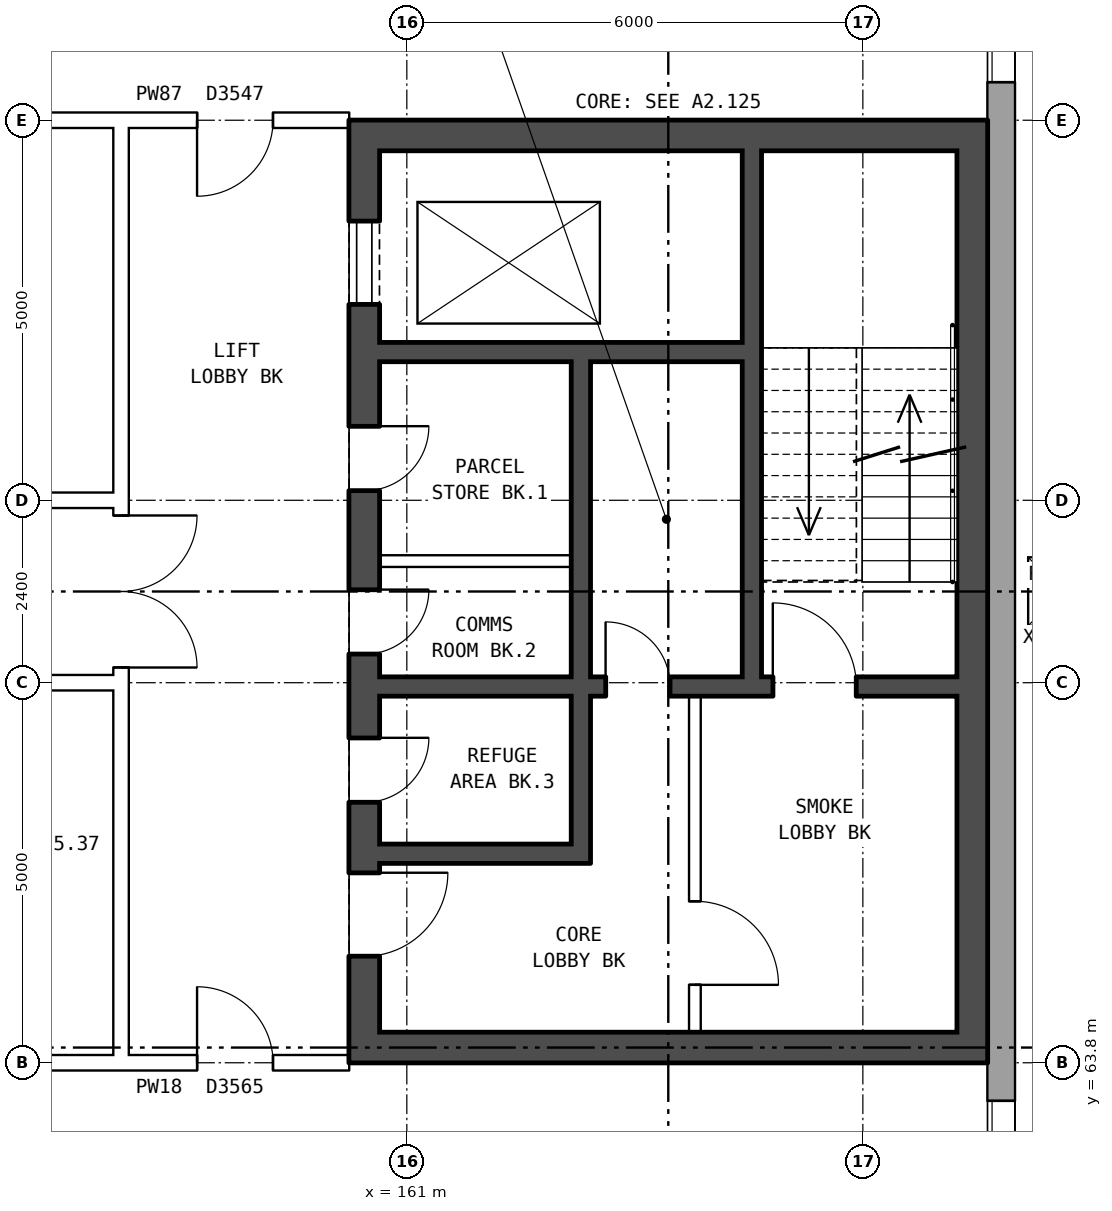
"""IFC4 building model, lengths in metres.
Left out: names, types, materials, properties, quantities, classifications, styles, units other than length and angle.
Written with IfcOpenShell. Run it as: python <this file> out.ifc"""

import sys

from ifc_helpers import new_model, si_unit, direction, frame, frame_2d, origin, origin_2d, place, context, subcontext, project, spatial, rectangle, extrude, element, fill, save


model = new_model("IFC4")
c1 = context("Model", 3, precision=1e-05, world=origin(), true_north=direction((0.0, 1.0)))
c2 = subcontext(c1, "Body", "Model", "MODEL_VIEW")
j1 = project(units=[si_unit("LENGTHUNIT", "METRE"), si_unit("PLANEANGLEUNIT", "RADIAN")], contexts=[c1])
p1 = place(None, origin())
s1 = spatial("IfcSite", under=j1, at=p1, CompositionType="ELEMENT")
p2 = place(p1, origin())
s2 = spatial("IfcBuilding", under=s1, at=p2, CompositionType="ELEMENT")
p3 = place(p2, frame((0.0, 0.0, 194.4)))
s3 = spatial("IfcBuildingStorey", under=s2, at=p3, CompositionType="ELEMENT", Elevation=194.4)
p4 = place(p3, frame((168.82, 57.075, 0.0), z_axis=(0.0, 0.0, 1.0), x_axis=(0.0, 1.0, 0.0)))
e1 = element("IfcWall", 1, at=p4, inside=s3, PredefinedType="STANDARD", context=c2, shape_type="SweptSolid", body=[
    extrude(rectangle(XDim=25.851, YDim=0.36, at=frame_2d((12.925, 0.0))), origin(), (0.0, 0.0, 1.0), 3.95),
])
p5 = place(p4, frame((1.625, 0.0, 1.5)))
e2 = element("IfcOpeningElement", 2, at=p5, cuts=e1, PredefinedType="OPENING", context=c2, shape_type="SweptSolid", body=[
    extrude(rectangle(XDim=1.6, YDim=1.2, at=frame_2d((0.8, 0.6))), frame((0.0, 0.19, 0.0), z_axis=(0.0, -1.0, 0.0), x_axis=(1.0, 0.0, 0.0)), (0.0, 0.0, 1.0), 0.38),
])
p6 = place(p4, frame((4.625, 0.0, 1.5)))
e3 = element("IfcOpeningElement", 3, at=p6, cuts=e1, PredefinedType="OPENING", context=c2, shape_type="SweptSolid", body=[
    extrude(rectangle(XDim=1.6, YDim=1.2, at=frame_2d((0.8, 0.6))), frame((0.0, 0.19, 0.0), z_axis=(0.0, -1.0, 0.0), x_axis=(1.0, 0.0, 0.0)), (0.0, 0.0, 1.0), 0.38),
])
p7 = place(p4, frame((19.625, 0.0, 1.5)))
e4 = element("IfcOpeningElement", 4, at=p7, cuts=e1, PredefinedType="OPENING", context=c2, shape_type="SweptSolid", body=[
    extrude(rectangle(XDim=1.6, YDim=1.2, at=frame_2d((0.8, 0.6))), frame((0.0, 0.19, 0.0), z_axis=(0.0, -1.0, 0.0), x_axis=(1.0, 0.0, 0.0)), (0.0, 0.0, 1.0), 0.38),
])
p8 = place(p4, frame((22.625, 0.0, 1.5)))
e5 = element("IfcOpeningElement", 5, at=p8, cuts=e1, PredefinedType="OPENING", context=c2, shape_type="SweptSolid", body=[
    extrude(rectangle(XDim=1.6, YDim=1.2, at=frame_2d((0.8, 0.6))), frame((0.0, 0.19, 0.0), z_axis=(0.0, -1.0, 0.0), x_axis=(1.0, 0.0, 0.0)), (0.0, 0.0, 1.0), 0.38),
])
p9 = place(p3, frame((160.44, 76.2, 0.0), z_axis=(0.0, 0.0, 1.0), x_axis=(0.0, -1.0, 0.0)))
e6 = element("IfcWall", 6, at=p9, inside=s3, PredefinedType="SHEAR", context=c2, shape_type="SweptSolid", body=[
    extrude(rectangle(XDim=12.4, YDim=0.4, at=frame_2d((6.2, 0.0))), origin(), (0.0, 0.0, 1.0), 3.95),
])
p10 = place(p9, frame((1.325, 0.0, 0.0)))
e7 = element("IfcOpeningElement", 7, at=p10, cuts=e6, PredefinedType="OPENING", context=c2, shape_type="SweptSolid", body=[
    extrude(rectangle(XDim=1.1, YDim=2.1, at=frame_2d((0.55, 1.05))), frame((0.0, 0.21, 0.0), z_axis=(0.0, -1.0, 0.0), x_axis=(1.0, 0.0, 0.0)), (0.0, 0.0, 1.0), 0.42),
])
p11 = place(p9, frame((4.025, 0.0, 0.0)))
e8 = element("IfcOpeningElement", 8, at=p11, cuts=e6, PredefinedType="OPENING", context=c2, shape_type="SweptSolid", body=[
    extrude(rectangle(XDim=0.85, YDim=2.1, at=frame_2d((0.425, 1.05))), frame((0.0, 0.21, 0.0), z_axis=(0.0, -1.0, 0.0), x_axis=(1.0, 0.0, 0.0)), (0.0, 0.0, 1.0), 0.42),
])
p12 = place(p9, frame((6.175, 0.0, 0.0)))
e9 = element("IfcOpeningElement", 9, at=p12, cuts=e6, PredefinedType="OPENING", context=c2, shape_type="SweptSolid", body=[
    extrude(rectangle(XDim=0.85, YDim=2.1, at=frame_2d((0.425, 1.05))), frame((0.0, 0.21, 0.0), z_axis=(0.0, -1.0, 0.0), x_axis=(1.0, 0.0, 0.0)), (0.0, 0.0, 1.0), 0.42),
])
p13 = place(p9, frame((9.9, 0.0, 0.0)))
e10 = element("IfcOpeningElement", 10, at=p13, cuts=e6, PredefinedType="OPENING", context=c2, shape_type="SweptSolid", body=[
    extrude(rectangle(XDim=1.1, YDim=2.1, at=frame_2d((0.55, 1.05))), frame((0.0, 0.21, 0.0), z_axis=(0.0, -1.0, 0.0), x_axis=(1.0, 0.0, 0.0)), (0.0, 0.0, 1.0), 0.42),
])
p14 = place(p9, frame((8.125, 0.0, 0.0)))
e11 = element("IfcOpeningElement", 11, at=p14, cuts=e6, PredefinedType="OPENING", context=c2, shape_type="SweptSolid", body=[
    extrude(rectangle(XDim=0.85, YDim=2.1, at=frame_2d((0.425, 1.05))), frame((0.0, 0.21, 0.0), z_axis=(0.0, -1.0, 0.0), x_axis=(1.0, 0.0, 0.0)), (0.0, 0.0, 1.0), 0.42),
])
p15 = place(p3, frame((168.44, 76.2, 0.0), z_axis=(0.0, 0.0, 1.0), x_axis=(0.0, -1.0, 0.0)))
e12 = element("IfcWall", 12, at=p15, inside=s3, PredefinedType="SHEAR", context=c2, shape_type="SweptSolid", body=[
    extrude(rectangle(XDim=12.4, YDim=0.4, at=frame_2d((6.2, 0.0))), origin(), (0.0, 0.0, 1.0), 3.95),
])
for number, where, z_axis, x_axis in (
    (13, (160.64, 76.0, 0.0), (0.0, 0.0, 1.0), (1.0, 0.0, 0.0)),
    (14, (160.64, 64.0, 0.0), (0.0, 0.0, 1.0), (1.0, 0.0, 0.0)),
):
    element("IfcWall", number, at=place(p3, frame(where, z_axis=z_axis, x_axis=x_axis)), inside=s3, PredefinedType="SHEAR", context=c2, shape_type="SweptSolid", body=[
        extrude(rectangle(XDim=7.6, YDim=0.4, at=frame_2d((3.8, 0.0))), origin(), (0.0, 0.0, 1.0), 3.95),
    ])
p16 = place(p3, frame((160.64, 73.15, 0.0), z_axis=(0.0, 0.0, 1.0), x_axis=(1.0, 0.0, 0.0)))
e15 = element("IfcWall", 15, at=p16, inside=s3, PredefinedType="SHEAR", context=c2, shape_type="SweptSolid", body=[
    extrude(rectangle(XDim=4.775, YDim=0.25, at=frame_2d((2.388, 0.0))), origin(), (0.0, 0.0, 1.0), 3.95),
])
p17 = place(p3, frame((160.64, 70.4, 0.0), z_axis=(0.0, 0.0, 1.0), x_axis=(1.0, 0.0, 0.0)))
e16 = element("IfcWall", 16, at=p17, inside=s3, PredefinedType="PARTITIONING", context=c2, shape_type="SweptSolid", body=[
    extrude(rectangle(XDim=2.525, YDim=0.15, at=frame_2d((1.263, 0.0))), origin(), (0.0, 0.0, 1.0), 3.95),
])
p18 = place(p3, frame((160.64, 68.75, 0.0), z_axis=(0.0, 0.0, 1.0), x_axis=(1.0, 0.0, 0.0)))
e17 = element("IfcWall", 17, at=p18, inside=s3, PredefinedType="SHEAR", context=c2, shape_type="SweptSolid", body=[
    extrude(rectangle(XDim=7.6, YDim=0.25, at=frame_2d((3.8, 0.0))), origin(), (0.0, 0.0, 1.0), 3.95),
])
p19 = place(p18, frame((5.175, 0.0, 0.0)))
e18 = element("IfcOpeningElement", 18, at=p19, cuts=e17, PredefinedType="OPENING", context=c2, shape_type="SweptSolid", body=[
    extrude(rectangle(XDim=1.1, YDim=2.1, at=frame_2d((0.55, 1.05))), frame((0.0, 0.135, 0.0), z_axis=(0.0, -1.0, 0.0), x_axis=(1.0, 0.0, 0.0)), (0.0, 0.0, 1.0), 0.27),
])
p20 = place(p18, frame((2.975, 0.0, 0.0)))
e19 = element("IfcOpeningElement", 19, at=p20, cuts=e17, PredefinedType="OPENING", context=c2, shape_type="SweptSolid", body=[
    extrude(rectangle(XDim=0.85, YDim=2.1, at=frame_2d((0.425, 1.05))), frame((0.0, 0.135, 0.0), z_axis=(0.0, -1.0, 0.0), x_axis=(1.0, 0.0, 0.0)), (0.0, 0.0, 1.0), 0.27),
])
p21 = place(p3, frame((160.64, 66.55, 0.0), z_axis=(0.0, 0.0, 1.0), x_axis=(1.0, 0.0, 0.0)))
e20 = element("IfcWall", 20, at=p21, inside=s3, PredefinedType="SHEAR", context=c2, shape_type="SweptSolid", body=[
    extrude(rectangle(XDim=2.525, YDim=0.25, at=frame_2d((1.263, 0.0))), origin(), (0.0, 0.0, 1.0), 3.95),
])
p22 = place(p3, frame((163.29, 73.025, 0.0), z_axis=(0.0, 0.0, 1.0), x_axis=(0.0, -1.0, 0.0)))
e21 = element("IfcWall", 21, at=p22, inside=s3, PredefinedType="SHEAR", context=c2, shape_type="SweptSolid", body=[
    extrude(rectangle(XDim=4.15, YDim=0.25, at=frame_2d((2.075, 0.0))), origin(), (0.0, 0.0, 1.0), 3.95),
])
p23 = place(p3, frame((163.29, 68.625, 0.0), z_axis=(0.0, 0.0, 1.0), x_axis=(0.0, -1.0, 0.0)))
e22 = element("IfcWall", 22, at=p23, inside=s3, PredefinedType="SHEAR", context=c2, shape_type="SweptSolid", body=[
    extrude(rectangle(XDim=2.2, YDim=0.25, at=frame_2d((1.1, 0.0))), origin(), (0.0, 0.0, 1.0), 3.95),
])
p24 = place(p3, frame((164.79, 68.625, 0.0), z_axis=(0.0, 0.0, 1.0), x_axis=(0.0, -1.0, 0.0)))
e23 = element("IfcWall", 23, at=p24, inside=s3, PredefinedType="PARTITIONING", context=c2, shape_type="SweptSolid", body=[
    extrude(rectangle(XDim=4.425, YDim=0.15, at=frame_2d((2.212, 0.0))), origin(), (0.0, 0.0, 1.0), 3.95),
])
p25 = place(p24, frame((2.7, 0.0, 0.0)))
e24 = element("IfcOpeningElement", 24, at=p25, cuts=e23, PredefinedType="OPENING", context=c2, shape_type="SweptSolid", body=[
    extrude(rectangle(XDim=1.1, YDim=2.1, at=frame_2d((0.55, 1.05))), frame((0.0, 0.085, 0.0), z_axis=(0.0, -1.0, 0.0), x_axis=(1.0, 0.0, 0.0)), (0.0, 0.0, 1.0), 0.17),
])
p26 = place(p3, frame((165.54, 75.8, 0.0), z_axis=(0.0, 0.0, 1.0), x_axis=(0.0, -1.0, 0.0)))
e25 = element("IfcWall", 25, at=p26, inside=s3, PredefinedType="SHEAR", context=c2, shape_type="SweptSolid", body=[
    extrude(rectangle(XDim=6.925, YDim=0.25, at=frame_2d((3.462, 0.0))), origin(), (0.0, 0.0, 1.0), 3.95),
])
p27 = place(p3, frame((157.24, 63.9, 0.0), z_axis=(0.0, 0.0, 1.0), x_axis=(0.0, 1.0, 0.0)))
e26 = element("IfcWall", 26, at=p27, inside=s3, PredefinedType="PARTITIONING", context=c2, shape_type="SweptSolid", body=[
    extrude(rectangle(XDim=12.2, YDim=0.2, at=frame_2d((6.1, 0.0))), origin(), (0.0, 0.0, 1.0), 3.95),
])
p28 = place(p27, frame((5.1, 0.0, 0.0)))
e27 = element("IfcOpeningElement", 27, at=p28, cuts=e26, PredefinedType="OPENING", context=c2, shape_type="SweptSolid", body=[
    extrude(rectangle(XDim=2.0, YDim=2.1, at=frame_2d((1.0, 1.05))), frame((0.0, 0.11, 0.0), z_axis=(0.0, -1.0, 0.0), x_axis=(1.0, 0.0, 0.0)), (0.0, 0.0, 1.0), 0.22),
])
p29 = place(p3, frame((142.76, 63.8, 0.0), z_axis=(0.0, 0.0, 1.0), x_axis=(1.0, 0.0, 0.0)))
e28 = element("IfcWall", 28, at=p29, inside=s3, PredefinedType="PARTITIONING", context=c2, shape_type="SweptSolid", body=[
    extrude(rectangle(XDim=14.48, YDim=0.2, at=frame_2d((7.24, 0.0))), origin(), (0.0, 0.0, 1.0), 3.95),
])
p30 = place(p29, frame((3.12, 0.0, 0.0)))
e29 = element("IfcOpeningElement", 29, at=p30, cuts=e28, PredefinedType="OPENING", context=c2, shape_type="SweptSolid", body=[
    extrude(rectangle(XDim=1.0, YDim=2.1, at=frame_2d((0.5, 1.05))), frame((0.0, 0.11, 0.0), z_axis=(0.0, -1.0, 0.0), x_axis=(1.0, 0.0, 0.0)), (0.0, 0.0, 1.0), 0.22),
])
p31 = place(p29, frame((10.36, 0.0, 0.0)))
e30 = element("IfcOpeningElement", 30, at=p31, cuts=e28, PredefinedType="OPENING", context=c2, shape_type="SweptSolid", body=[
    extrude(rectangle(XDim=1.0, YDim=2.1, at=frame_2d((0.5, 1.05))), frame((0.0, 0.11, 0.0), z_axis=(0.0, -1.0, 0.0), x_axis=(1.0, 0.0, 0.0)), (0.0, 0.0, 1.0), 0.22),
])
p32 = place(p3, frame((157.24, 63.8, 0.0), z_axis=(0.0, 0.0, 1.0), x_axis=(1.0, 0.0, 0.0)))
e31 = element("IfcWall", 31, at=p32, inside=s3, PredefinedType="PARTITIONING", context=c2, shape_type="SweptSolid", body=[
    extrude(rectangle(XDim=3.0, YDim=0.2, at=frame_2d((1.5, 0.0))), origin(), (0.0, 0.0, 1.0), 3.95),
])
p33 = place(p32, frame((1.0, 0.0, 0.0)))
e32 = element("IfcOpeningElement", 32, at=p33, cuts=e31, PredefinedType="OPENING", context=c2, shape_type="SweptSolid", body=[
    extrude(rectangle(XDim=1.0, YDim=2.1, at=frame_2d((0.5, 1.05))), frame((0.0, 0.11, 0.0), z_axis=(0.0, -1.0, 0.0), x_axis=(1.0, 0.0, 0.0)), (0.0, 0.0, 1.0), 0.22),
])
for number, where, z_axis, x_axis in (
    (33, (142.76, 68.8, 0.0), (0.0, 0.0, 1.0), (1.0, 0.0, 0.0)),
    (34, (142.76, 71.2, 0.0), (0.0, 0.0, 1.0), (1.0, 0.0, 0.0)),
):
    element("IfcWall", number, at=place(p3, frame(where, z_axis=z_axis, x_axis=x_axis)), inside=s3, PredefinedType="PARTITIONING", context=c2, shape_type="SweptSolid", body=[
        extrude(rectangle(XDim=14.48, YDim=0.2, at=frame_2d((7.24, 0.0))), origin(), (0.0, 0.0, 1.0), 3.95),
    ])
p34 = place(p3, frame((142.76, 76.2, 0.0), z_axis=(0.0, 0.0, 1.0), x_axis=(1.0, 0.0, 0.0)))
e35 = element("IfcWall", 35, at=p34, inside=s3, PredefinedType="PARTITIONING", context=c2, shape_type="SweptSolid", body=[
    extrude(rectangle(XDim=14.48, YDim=0.2, at=frame_2d((7.24, 0.0))), origin(), (0.0, 0.0, 1.0), 3.95),
])
p35 = place(p34, frame((3.12, 0.0, 0.0)))
e36 = element("IfcOpeningElement", 36, at=p35, cuts=e35, PredefinedType="OPENING", context=c2, shape_type="SweptSolid", body=[
    extrude(rectangle(XDim=1.0, YDim=2.1, at=frame_2d((0.5, 1.05))), frame((0.0, 0.11, 0.0), z_axis=(0.0, -1.0, 0.0), x_axis=(1.0, 0.0, 0.0)), (0.0, 0.0, 1.0), 0.22),
])
p36 = place(p34, frame((10.36, 0.0, 0.0)))
e37 = element("IfcOpeningElement", 37, at=p36, cuts=e35, PredefinedType="OPENING", context=c2, shape_type="SweptSolid", body=[
    extrude(rectangle(XDim=1.0, YDim=2.1, at=frame_2d((0.5, 1.05))), frame((0.0, 0.11, 0.0), z_axis=(0.0, -1.0, 0.0), x_axis=(1.0, 0.0, 0.0)), (0.0, 0.0, 1.0), 0.22),
])
p37 = place(p3, frame((157.24, 76.2, 0.0), z_axis=(0.0, 0.0, 1.0), x_axis=(1.0, 0.0, 0.0)))
e38 = element("IfcWall", 38, at=p37, inside=s3, PredefinedType="PARTITIONING", context=c2, shape_type="SweptSolid", body=[
    extrude(rectangle(XDim=3.0, YDim=0.2, at=frame_2d((1.5, 0.0))), origin(), (0.0, 0.0, 1.0), 3.95),
])
p38 = place(p37, frame((1.0, 0.0, 0.0)))
e39 = element("IfcOpeningElement", 39, at=p38, cuts=e38, PredefinedType="OPENING", context=c2, shape_type="SweptSolid", body=[
    extrude(rectangle(XDim=1.0, YDim=2.1, at=frame_2d((0.5, 1.05))), frame((0.0, 0.11, 0.0), z_axis=(0.0, -1.0, 0.0), x_axis=(1.0, 0.0, 0.0)), (0.0, 0.0, 1.0), 0.22),
])
p39 = place(p6, origin())
e40 = element("IfcWindow", 40, at=p39, inside=s3, PartitioningType="DOUBLE_PANEL_HORIZONTAL", PredefinedType="WINDOW", context=c2, shape_type="SweptSolid", body=[
    extrude(rectangle(XDim=1.6, YDim=1.2, at=frame_2d((0.8, 0.6))), frame((0.0, 0.15, 0.0), z_axis=(0.0, -1.0, 0.0), x_axis=(1.0, 0.0, 0.0)), (0.0, 0.0, 1.0), 0.06),
])
fill(e3, e40)
p40 = place(p7, origin())
e41 = element("IfcWindow", 41, at=p40, inside=s3, PartitioningType="DOUBLE_PANEL_HORIZONTAL", PredefinedType="WINDOW", context=c2, shape_type="SweptSolid", body=[
    extrude(rectangle(XDim=1.6, YDim=1.2, at=frame_2d((0.8, 0.6))), frame((0.0, 0.15, 0.0), z_axis=(0.0, -1.0, 0.0), x_axis=(1.0, 0.0, 0.0)), (0.0, 0.0, 1.0), 0.06),
])
fill(e4, e41)
p41 = place(p3, frame((0.0, 0.0, -0.25)))
p42 = place(p41, frame((169.625, 70.0, 0.0)))
p43 = place(p42, frame((0.0, 0.0, 0.2)))
e42 = element("IfcWindow", 42, at=p43, inside=s3, PartitioningType="SINGLE_PANEL", PredefinedType="SKYLIGHT", context=c2, shape_type="SweptSolid", body=[
    extrude(rectangle(XDim=0.9, YDim=0.9, at=origin_2d()), origin(), (0.0, 0.0, 1.0), 0.05),
])
p44 = place(p10, origin())
e43 = element("IfcDoor", 43, at=p44, inside=s3, OperationType="DOUBLE_DOOR_SLIDING", PredefinedType="DOOR", context=c2, shape_type="SweptSolid", body=[
    extrude(rectangle(XDim=1.1, YDim=2.1, at=frame_2d((0.55, 1.05))), frame((0.0, 0.185, 0.0), z_axis=(0.0, -1.0, 0.0), x_axis=(1.0, 0.0, 0.0)), (0.0, 0.0, 1.0), 0.05),
])
fill(e7, e43)
p45 = place(p11, origin())
e44 = element("IfcDoor", 44, at=p45, inside=s3, OperationType="SINGLE_SWING_LEFT", PredefinedType="DOOR", context=c2, shape_type="SweptSolid", body=[
    extrude(rectangle(XDim=0.85, YDim=2.1, at=frame_2d((0.425, 1.05))), frame((0.0, 0.185, 0.0), z_axis=(0.0, -1.0, 0.0), x_axis=(1.0, 0.0, 0.0)), (0.0, 0.0, 1.0), 0.05),
])
fill(e8, e44)
p46 = place(p12, origin())
e45 = element("IfcDoor", 45, at=p46, inside=s3, OperationType="SINGLE_SWING_LEFT", PredefinedType="DOOR", context=c2, shape_type="SweptSolid", body=[
    extrude(rectangle(XDim=0.85, YDim=2.1, at=frame_2d((0.425, 1.05))), frame((0.0, 0.185, 0.0), z_axis=(0.0, -1.0, 0.0), x_axis=(1.0, 0.0, 0.0)), (0.0, 0.0, 1.0), 0.05),
])
fill(e9, e45)
p47 = place(p13, origin())
e46 = element("IfcDoor", 46, at=p47, inside=s3, OperationType="SINGLE_SWING_LEFT", PredefinedType="DOOR", context=c2, shape_type="SweptSolid", body=[
    extrude(rectangle(XDim=1.1, YDim=2.1, at=frame_2d((0.55, 1.05))), frame((0.0, 0.185, 0.0), z_axis=(0.0, -1.0, 0.0), x_axis=(1.0, 0.0, 0.0)), (0.0, 0.0, 1.0), 0.05),
])
fill(e10, e46)
p48 = place(p25, origin())
e47 = element("IfcDoor", 47, at=p48, inside=s3, OperationType="SINGLE_SWING_RIGHT", PredefinedType="DOOR", context=c2, shape_type="SweptSolid", body=[
    extrude(rectangle(XDim=1.1, YDim=2.1, at=frame_2d((0.55, 1.05))), frame((0.0, 0.025, 0.0), z_axis=(0.0, -1.0, 0.0), x_axis=(1.0, 0.0, 0.0)), (0.0, 0.0, 1.0), 0.05),
])
fill(e24, e47)
p49 = place(p19, origin())
e48 = element("IfcDoor", 48, at=p49, inside=s3, OperationType="SINGLE_SWING_LEFT", PredefinedType="DOOR", context=c2, shape_type="SweptSolid", body=[
    extrude(rectangle(XDim=1.1, YDim=2.1, at=frame_2d((0.55, 1.05))), frame((0.0, 0.025, 0.0), z_axis=(0.0, -1.0, 0.0), x_axis=(1.0, 0.0, 0.0)), (0.0, 0.0, 1.0), 0.05),
])
fill(e18, e48)
p50 = place(p14, origin())
e49 = element("IfcDoor", 49, at=p50, inside=s3, OperationType="SINGLE_SWING_LEFT", PredefinedType="DOOR", context=c2, shape_type="SweptSolid", body=[
    extrude(rectangle(XDim=0.85, YDim=2.1, at=frame_2d((0.425, 1.05))), frame((0.0, 0.185, 0.0), z_axis=(0.0, -1.0, 0.0), x_axis=(1.0, 0.0, 0.0)), (0.0, 0.0, 1.0), 0.05),
])
fill(e11, e49)
p51 = place(p20, origin())
e50 = element("IfcDoor", 50, at=p51, inside=s3, OperationType="SINGLE_SWING_LEFT", PredefinedType="DOOR", context=c2, shape_type="SweptSolid", body=[
    extrude(rectangle(XDim=0.85, YDim=2.1, at=frame_2d((0.425, 1.05))), frame((0.0, 0.025, 0.0), z_axis=(0.0, -1.0, 0.0), x_axis=(1.0, 0.0, 0.0)), (0.0, 0.0, 1.0), 0.05),
])
fill(e19, e50)
p52 = place(p28, frame((2.0, 0.0, 0.0), z_axis=(0.0, 0.0, 1.0), x_axis=(-1.0, 0.0, 0.0)))
e51 = element("IfcDoor", 51, at=p52, inside=s3, OperationType="DOUBLE_DOOR_SINGLE_SWING", PredefinedType="DOOR", context=c2, shape_type="SweptSolid", body=[
    extrude(rectangle(XDim=2.0, YDim=2.1, at=frame_2d((1.0, 1.05))), frame((0.0, 0.025, 0.0), z_axis=(0.0, -1.0, 0.0), x_axis=(1.0, 0.0, 0.0)), (0.0, 0.0, 1.0), 0.05),
])
fill(e27, e51)
p53 = place(p33, origin())
e52 = element("IfcDoor", 52, at=p53, inside=s3, OperationType="SINGLE_SWING_LEFT", PredefinedType="DOOR", context=c2, shape_type="SweptSolid", body=[
    extrude(rectangle(XDim=1.0, YDim=2.1, at=frame_2d((0.5, 1.05))), frame((0.0, 0.025, 0.0), z_axis=(0.0, -1.0, 0.0), x_axis=(1.0, 0.0, 0.0)), (0.0, 0.0, 1.0), 0.05),
])
fill(e32, e52)
p54 = place(p38, frame((1.0, 0.0, 0.0), z_axis=(0.0, 0.0, 1.0), x_axis=(-1.0, 0.0, 0.0)))
e53 = element("IfcDoor", 53, at=p54, inside=s3, OperationType="SINGLE_SWING_RIGHT", PredefinedType="DOOR", context=c2, shape_type="SweptSolid", body=[
    extrude(rectangle(XDim=1.0, YDim=2.1, at=frame_2d((0.5, 1.05))), frame((0.0, 0.025, 0.0), z_axis=(0.0, -1.0, 0.0), x_axis=(1.0, 0.0, 0.0)), (0.0, 0.0, 1.0), 0.05),
])
fill(e39, e53)
save(model, sys.argv[1])
